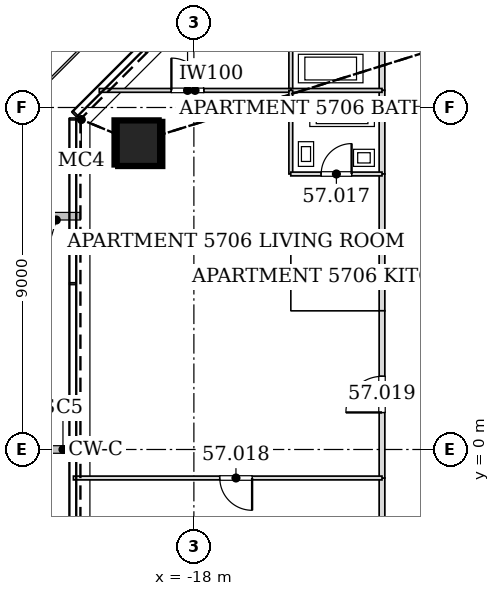
"""IFC4 building model, lengths in metres.
Left out: names, types, materials, properties, quantities, classifications, styles, units other than length and angle.
Written with IfcOpenShell. Run it as: python <this file> out.ifc"""

import sys

from ifc_helpers import new_model, si_unit, direction, frame, frame_2d, origin, origin_2d, place, context, subcontext, project, spatial, rectangle, hollow_rectangle, extrude, element, fill, save


model = new_model("IFC4")
c1 = context("Model", 3, precision=1e-05, world=origin(), true_north=direction((0.0, 1.0)))
c2 = subcontext(c1, "Body", "Model", "MODEL_VIEW")
j1 = project(units=[si_unit("LENGTHUNIT", "METRE"), si_unit("PLANEANGLEUNIT", "RADIAN")], contexts=[c1])
p1 = place(None, origin())
s1 = spatial("IfcSite", under=j1, at=p1, CompositionType="ELEMENT")
p2 = place(p1, origin())
s2 = spatial("IfcBuilding", under=s1, at=p2, CompositionType="ELEMENT")
p3 = place(p2, frame((0.0, 0.0, 241.4)))
s3 = spatial("IfcBuildingStorey", under=s2, at=p3, CompositionType="ELEMENT", Elevation=241.4)
p4 = place(p3, frame((-19.508, 8.08, 0.0), z_axis=(0.028277121884, -0.011698403216, 0.999531666202), x_axis=(0.382282742426, 0.924045401938, 0.0)))
e1 = element("IfcColumn", 1, at=p4, inside=s3, PredefinedType="COLUMN", context=c2, shape_type="SweptSolid", body=[
    extrude(hollow_rectangle(XDim=1.2, YDim=1.2, WallThickness=0.055, at=origin_2d()), origin(), (0.0, 0.0, 1.0), 3.402),
])
p5 = place(p3, frame((-20.386, 0.0, 0.0), z_axis=(0.028207339906, 0.0, 0.999602093823), x_axis=(0.0, 1.0, 0.0)))
e2 = element("IfcColumn", 2, at=p5, inside=s3, PredefinedType="COLUMN", context=c2, shape_type="SweptSolid", body=[
    extrude(hollow_rectangle(XDim=0.45, YDim=0.45, WallThickness=0.02, at=origin_2d()), origin(), (0.0, 0.0, 1.0), 3.402),
])
p6 = place(p3, frame((-13.05, 11.651, 0.0), z_axis=(0.0, 0.0, 1.0), x_axis=(0.0, -1.0, 0.0)))
e3 = element("IfcWall", 3, at=p6, inside=s3, PredefinedType="PARTITIONING", context=c2, shape_type="SweptSolid", body=[
    extrude(rectangle(XDim=2.202, YDim=0.15, at=frame_2d((1.101, 0.0))), origin(), (0.0, 0.0, 1.0), 2.349),
])
p7 = place(p3, frame((-13.05, 9.451, 0.0), z_axis=(0.0, 0.0, 1.0), x_axis=(0.0, -1.0, 0.0)))
e4 = element("IfcWall", 4, at=p7, inside=s3, PredefinedType="PARTITIONING", context=c2, shape_type="SweptSolid", body=[
    extrude(rectangle(XDim=2.202, YDim=0.15, at=frame_2d((1.101, 0.0))), origin(), (0.0, 0.0, 1.0), 2.662),
])
p8 = place(p3, frame((-13.05, 5.451, 0.0), z_axis=(0.0, 0.0, 1.0), x_axis=(0.0, -1.0, 0.0)))
e5 = element("IfcWall", 5, at=p8, inside=s3, PredefinedType="PARTITIONING", context=c2, shape_type="SweptSolid", body=[
    extrude(rectangle(XDim=1.802, YDim=0.15, at=frame_2d((0.901, 0.0))), origin(), (0.0, 0.0, 1.0), 2.662),
])
p9 = place(p3, frame((-13.05, -0.749, 0.0), z_axis=(0.0, 0.0, 1.0), x_axis=(0.0, -1.0, 0.0)))
e6 = element("IfcWall", 6, at=p9, inside=s3, PredefinedType="PARTITIONING", context=c2, shape_type="SweptSolid", body=[
    extrude(rectangle(XDim=3.702, YDim=0.15, at=frame_2d((1.851, 0.0))), origin(), (0.0, 0.0, 1.0), 2.662),
])
p10 = place(p3, frame((-13.05, 3.651, 0.0), z_axis=(0.0, 0.0, 1.0), x_axis=(0.0, -1.0, 0.0)))
e7 = element("IfcWall", 7, at=p10, inside=s3, PredefinedType="PARTITIONING", context=c2, shape_type="SweptSolid", body=[
    extrude(rectangle(XDim=4.402, YDim=0.15, at=frame_2d((2.201, 0.0))), origin(), (0.0, 0.0, 1.0), 2.332),
])
p11 = place(p10, frame((1.726, 0.0, 0.0)))
e8 = element("IfcOpeningElement", 8, at=p11, cuts=e7, PredefinedType="OPENING", context=c2, shape_type="SweptSolid", body=[
    extrude(rectangle(XDim=0.95, YDim=2.1, at=frame_2d((0.475, 1.05))), frame((0.0, 0.085, 0.0), z_axis=(0.0, -1.0, 0.0), x_axis=(1.0, 0.0, 0.0)), (0.0, 0.0, 1.0), 0.17),
])
p12 = place(p3, frame((-13.05, 7.251, 0.0), z_axis=(0.0, 0.0, 1.0), x_axis=(0.0, -1.0, 0.0)))
e9 = element("IfcWall", 9, at=p12, inside=s3, PredefinedType="PARTITIONING", context=c2, shape_type="SweptSolid", body=[
    extrude(rectangle(XDim=1.802, YDim=0.15, at=frame_2d((0.901, 0.0))), origin(), (0.0, 0.0, 1.0), 2.662),
])
p13 = place(p3, frame((-15.45, 11.65, 0.0), z_axis=(0.0, 0.0, 1.0), x_axis=(0.0, -1.0, 0.0)))
e10 = element("IfcWall", 10, at=p13, inside=s3, PredefinedType="PARTITIONING", context=c2, shape_type="SweptSolid", body=[
    extrude(rectangle(XDim=2.2, YDim=0.1, at=frame_2d((1.1, 0.0))), origin(), (0.0, 0.0, 1.0), 2.349),
])
p14 = place(p3, frame((-15.45, 9.45, 0.0), z_axis=(0.0, 0.0, 1.0), x_axis=(1.0, 0.0, 0.0)))
e11 = element("IfcWall", 11, at=p14, inside=s3, PredefinedType="PARTITIONING", context=c2, shape_type="SweptSolid", body=[
    extrude(rectangle(XDim=2.4, YDim=0.1, at=frame_2d((1.2, 0.0))), origin(), (0.0, 0.0, 1.0), 2.349),
])
p15 = place(p3, frame((-20.49, 9.45, 0.0), z_axis=(0.0, 0.0, 1.0), x_axis=(1.0, 0.0, 0.0)))
e12 = element("IfcWall", 12, at=p15, inside=s3, PredefinedType="PARTITIONING", context=c2, shape_type="SweptSolid", body=[
    extrude(rectangle(XDim=5.04, YDim=0.1, at=frame_2d((2.52, 0.0))), origin(), (0.0, 0.0, 1.0), 2.349),
])
p16 = place(p15, frame((1.898, 0.0, 0.0)))
e13 = element("IfcOpeningElement", 13, at=p16, cuts=e12, PredefinedType="OPENING", context=c2, shape_type="SweptSolid", body=[
    extrude(rectangle(XDim=0.85, YDim=2.1, at=frame_2d((0.425, 1.05))), frame((0.0, 0.06, 0.0), z_axis=(0.0, -1.0, 0.0), x_axis=(1.0, 0.0, 0.0)), (0.0, 0.0, 1.0), 0.12),
])
p17 = place(p3, frame((-15.45, 9.45, 0.0), z_axis=(0.0, 0.0, 1.0), x_axis=(0.0, -1.0, 0.0)))
e14 = element("IfcWall", 14, at=p17, inside=s3, PredefinedType="PARTITIONING", context=c2, shape_type="SweptSolid", body=[
    extrude(rectangle(XDim=2.2, YDim=0.1, at=frame_2d((1.1, 0.0))), origin(), (0.0, 0.0, 1.0), 2.349),
])
p18 = place(p3, frame((-15.45, 7.25, 0.0), z_axis=(0.0, 0.0, 1.0), x_axis=(1.0, 0.0, 0.0)))
e15 = element("IfcWall", 15, at=p18, inside=s3, PredefinedType="PARTITIONING", context=c2, shape_type="SweptSolid", body=[
    extrude(rectangle(XDim=2.4, YDim=0.1, at=frame_2d((1.2, 0.0))), origin(), (0.0, 0.0, 1.0), 2.662),
])
p19 = place(p18, frame((0.8, 0.0, 0.0)))
e16 = element("IfcOpeningElement", 16, at=p19, cuts=e15, PredefinedType="OPENING", context=c2, shape_type="SweptSolid", body=[
    extrude(rectangle(XDim=0.8, YDim=2.1, at=frame_2d((0.4, 1.05))), frame((0.0, 0.06, 0.0), z_axis=(0.0, -1.0, 0.0), x_axis=(1.0, 0.0, 0.0)), (0.0, 0.0, 1.0), 0.12),
])
p20 = place(p3, frame((-13.05, -0.75, 0.0), z_axis=(0.0, 0.0, 1.0), x_axis=(-1.0, 0.0, 0.0)))
e17 = element("IfcWall", 17, at=p20, inside=s3, PredefinedType="PARTITIONING", context=c2, shape_type="SweptSolid", body=[
    extrude(rectangle(XDim=8.12, YDim=0.1, at=frame_2d((4.06, 0.0))), origin(), (0.0, 0.0, 1.0), 2.662),
])
p21 = place(p20, frame((3.418, 0.0, 0.0)))
e18 = element("IfcOpeningElement", 18, at=p21, cuts=e17, PredefinedType="OPENING", context=c2, shape_type="SweptSolid", body=[
    extrude(rectangle(XDim=0.85, YDim=2.1, at=frame_2d((0.425, 1.05))), frame((0.0, 0.06, 0.0), z_axis=(0.0, -1.0, 0.0), x_axis=(1.0, 0.0, 0.0)), (0.0, 0.0, 1.0), 0.12),
])
p22 = place(p16, origin())
e19 = element("IfcDoor", 19, at=p22, inside=s3, OperationType="SINGLE_SWING_LEFT", PredefinedType="DOOR", context=c2, shape_type="SweptSolid", body=[
    extrude(rectangle(XDim=0.85, YDim=2.1, at=frame_2d((0.425, 1.05))), frame((0.0, 0.025, 0.0), z_axis=(0.0, -1.0, 0.0), x_axis=(1.0, 0.0, 0.0)), (0.0, 0.0, 1.0), 0.05),
])
fill(e13, e19)
p23 = place(p19, origin())
e20 = element("IfcDoor", 20, at=p23, inside=s3, OperationType="SINGLE_SWING_RIGHT", PredefinedType="DOOR", context=c2, shape_type="SweptSolid", body=[
    extrude(rectangle(XDim=0.8, YDim=2.1, at=frame_2d((0.4, 1.05))), frame((0.0, 0.025, 0.0), z_axis=(0.0, -1.0, 0.0), x_axis=(1.0, 0.0, 0.0)), (0.0, 0.0, 1.0), 0.05),
])
fill(e16, e20)
p24 = place(p21, origin())
e21 = element("IfcDoor", 21, at=p24, inside=s3, OperationType="SINGLE_SWING_LEFT", PredefinedType="DOOR", context=c2, shape_type="SweptSolid", body=[
    extrude(rectangle(XDim=0.85, YDim=2.1, at=frame_2d((0.425, 1.05))), frame((0.0, 0.025, 0.0), z_axis=(0.0, -1.0, 0.0), x_axis=(1.0, 0.0, 0.0)), (0.0, 0.0, 1.0), 0.05),
])
fill(e18, e21)
p25 = place(p11, frame((0.95, 0.0, 0.0), z_axis=(0.0, 0.0, 1.0), x_axis=(-1.0, 0.0, 0.0)))
e22 = element("IfcDoor", 22, at=p25, inside=s3, OperationType="SINGLE_SWING_LEFT", PredefinedType="DOOR", context=c2, shape_type="SweptSolid", body=[
    extrude(rectangle(XDim=0.95, YDim=2.1, at=frame_2d((0.475, 1.05))), frame((0.0, 0.025, 0.0), z_axis=(0.0, -1.0, 0.0), x_axis=(1.0, 0.0, 0.0)), (0.0, 0.0, 1.0), 0.05),
])
fill(e8, e22)
save(model, sys.argv[1])
